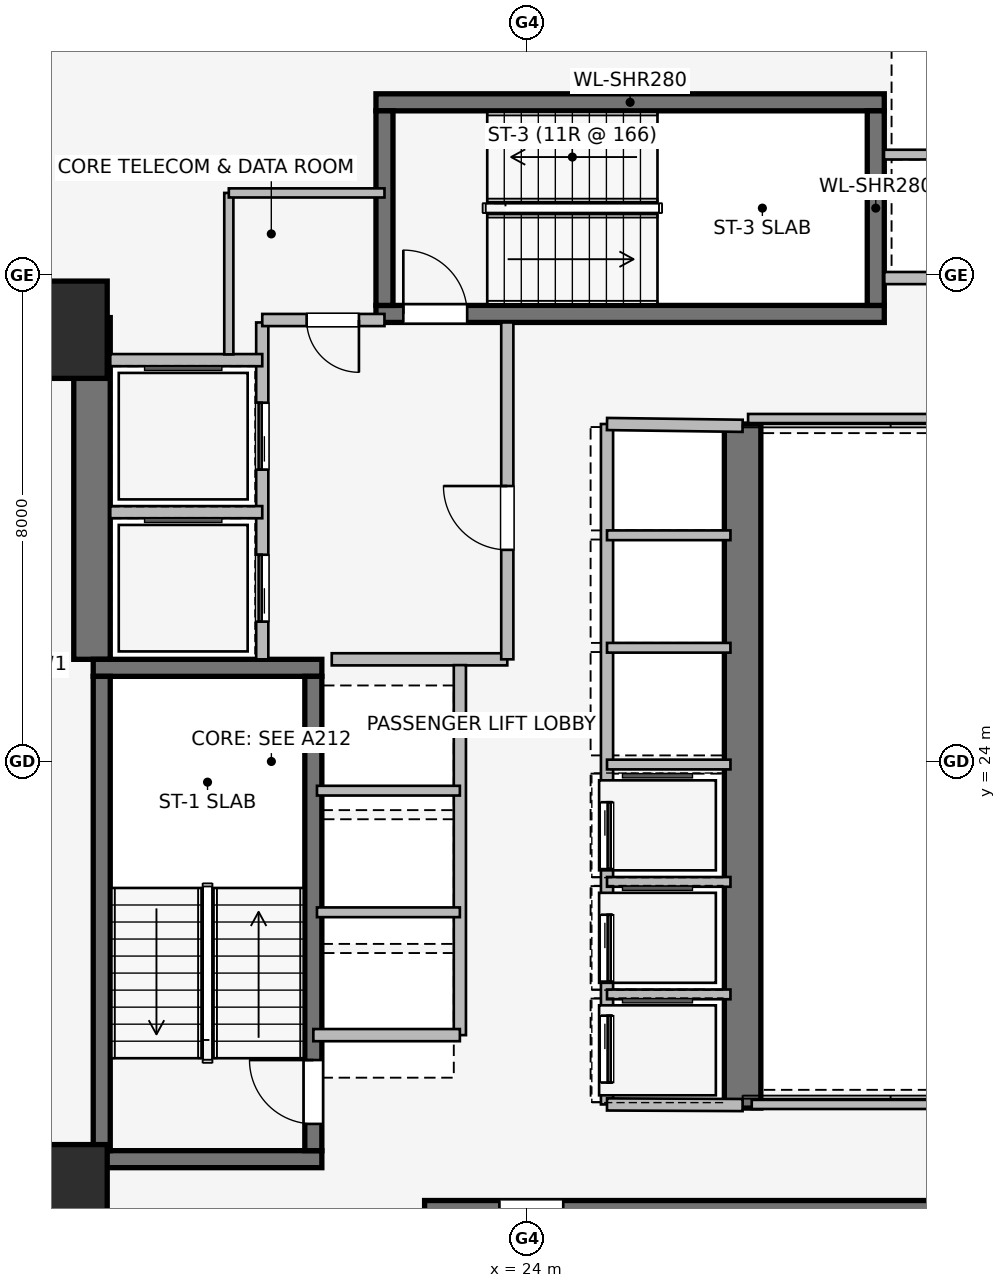
"""IFC4 building model, lengths in metres.
Left out: names, types, materials, properties, quantities, classifications, styles, units other than length and angle.
Written with IfcOpenShell. Run it as: python <this file> out.ifc"""

import sys

from ifc_helpers import new_model, si_unit, direction, frame, frame_2d, origin, origin_2d, place, context, subcontext, project, spatial, rectangle, extrude, element, fill, save


model = new_model("IFC4")
c1 = context("Model", 3, precision=1e-05, world=origin(), true_north=direction((0.0, 1.0)))
c2 = subcontext(c1, "Body", "Model", "MODEL_VIEW")
j1 = project(units=[si_unit("LENGTHUNIT", "METRE"), si_unit("PLANEANGLEUNIT", "RADIAN")], contexts=[c1])
p1 = place(None, origin())
s1 = spatial("IfcSite", under=j1, at=p1, CompositionType="ELEMENT")
p2 = place(p1, origin())
s2 = spatial("IfcBuilding", under=s1, at=p2, CompositionType="ELEMENT")
p3 = place(p2, frame((0.0, 0.0, 41.6)))
s3 = spatial("IfcBuildingStorey", under=s2, at=p3, CompositionType="ELEMENT", Elevation=41.6)
p4 = place(p3, frame((16.85, 25.68, 0.0), z_axis=(0.0, 0.0, 1.0), x_axis=(0.0, 1.0, 0.0)))
e1 = element("IfcWall", 1, at=p4, inside=s3, PredefinedType="SHEAR", context=c2, shape_type="SweptSolid", body=[
    extrude(rectangle(XDim=5.62, YDim=0.6, at=frame_2d((2.81, 0.0))), origin(), (0.0, 0.0, 1.0), 3.65),
])
p5 = place(p3, frame((27.55, 29.55, 0.0), z_axis=(0.0, 0.0, 1.0), x_axis=(0.0, -1.0, 0.0)))
e2 = element("IfcWall", 2, at=p5, inside=s3, PredefinedType="SHEAR", context=c2, shape_type="SweptSolid", body=[
    extrude(rectangle(XDim=11.25, YDim=0.6, at=frame_2d((5.625, 0.0))), origin(), (0.0, 0.0, 1.0), 3.65),
])
for number, where, z_axis, x_axis in (
    (3, (16.87, 17.46, 0.0), (0.0, 0.0, 1.0), (1.0, 0.0, 0.0)),
    (4, (20.63, 25.54, 0.0), (0.0, 0.0, 1.0), (-1.0, 0.0, 0.0)),
):
    element("IfcWall", number, at=place(p3, frame(where, z_axis=z_axis, x_axis=x_axis)), inside=s3, PredefinedType="SHEAR", context=c2, shape_type="SweptSolid", body=[
        extrude(rectangle(XDim=3.76, YDim=0.28, at=frame_2d((1.88, 0.0))), origin(), (0.0, 0.0, 1.0), 3.65),
    ])
p6 = place(p3, frame((17.01, 25.4, 0.0), z_axis=(0.0, 0.0, 1.0), x_axis=(0.0, -1.0, 0.0)))
e5 = element("IfcWall", 5, at=p6, inside=s3, PredefinedType="SHEAR", context=c2, shape_type="SweptSolid", body=[
    extrude(rectangle(XDim=7.8, YDim=0.28, at=frame_2d((3.9, 0.0))), origin(), (0.0, 0.0, 1.0), 3.65),
])
p7 = place(p3, frame((20.49, 17.6, 0.0), z_axis=(0.0, 0.0, 1.0), x_axis=(0.0, 1.0, 0.0)))
e6 = element("IfcWall", 6, at=p7, inside=s3, PredefinedType="SHEAR", context=c2, shape_type="SweptSolid", body=[
    extrude(rectangle(XDim=7.8, YDim=0.28, at=frame_2d((3.9, 0.0))), origin(), (0.0, 0.0, 1.0), 3.65),
])
p8 = place(p7, frame((0.44, 0.0, 0.0)))
e7 = element("IfcOpeningElement", 7, at=p8, cuts=e6, PredefinedType="OPENING", context=c2, shape_type="SweptSolid", body=[
    extrude(rectangle(XDim=1.05, YDim=2.0, at=frame_2d((0.525, 1.0))), frame((0.0, 0.15, 0.0), z_axis=(0.0, -1.0, 0.0), x_axis=(1.0, 0.0, 0.0)), (0.0, 0.0, 1.0), 0.3),
])
p9 = place(p3, frame((30.68, 16.64, 0.0), z_axis=(0.0, 0.0, 1.0), x_axis=(-1.0, 0.0, 0.0)))
e8 = element("IfcWall", 8, at=p9, inside=s3, PredefinedType="SHEAR", context=c2, shape_type="SweptSolid", body=[
    extrude(rectangle(XDim=8.36, YDim=0.28, at=frame_2d((4.18, 0.0))), origin(), (0.0, 0.0, 1.0), 3.65),
])
p10 = place(p9, frame((6.08, 0.0, 0.0)))
e9 = element("IfcOpeningElement", 9, at=p10, cuts=e8, PredefinedType="OPENING", context=c2, shape_type="SweptSolid", body=[
    extrude(rectangle(XDim=1.05, YDim=2.0, at=frame_2d((0.525, 1.0))), frame((0.0, 0.15, 0.0), z_axis=(0.0, -1.0, 0.0), x_axis=(1.0, 0.0, 0.0)), (0.0, 0.0, 1.0), 0.3),
])
p11 = place(p3, frame((21.52, 31.36, 0.0), z_axis=(0.0, 0.0, 1.0), x_axis=(1.0, 0.0, 0.0)))
e10 = element("IfcWall", 10, at=p11, inside=s3, PredefinedType="SHEAR", context=c2, shape_type="SweptSolid", body=[
    extrude(rectangle(XDim=8.36, YDim=0.28, at=frame_2d((4.18, 0.0))), origin(), (0.0, 0.0, 1.0), 3.65),
])
p12 = place(p11, frame((0.45, 0.0, 0.0)))
e11 = element("IfcOpeningElement", 11, at=p12, cuts=e10, PredefinedType="OPENING", context=c2, shape_type="SweptSolid", body=[
    extrude(rectangle(XDim=1.05, YDim=2.0, at=frame_2d((0.525, 1.0))), frame((0.0, 0.15, 0.0), z_axis=(0.0, -1.0, 0.0), x_axis=(1.0, 0.0, 0.0)), (0.0, 0.0, 1.0), 0.3),
])
p13 = place(p3, frame((29.88, 34.84, 0.0), z_axis=(0.0, 0.0, 1.0), x_axis=(-1.0, 0.0, 0.0)))
e12 = element("IfcWall", 12, at=p13, inside=s3, PredefinedType="SHEAR", context=c2, shape_type="SweptSolid", body=[
    extrude(rectangle(XDim=8.36, YDim=0.28, at=frame_2d((4.18, 0.0))), origin(), (0.0, 0.0, 1.0), 3.65),
])
for number, where, z_axis, x_axis in (
    (13, (21.66, 34.7, 0.0), (0.0, 0.0, 1.0), (0.0, -1.0, 0.0)),
    (14, (29.74, 31.5, 0.0), (0.0, 0.0, 1.0), (0.0, 1.0, 0.0)),
):
    element("IfcWall", number, at=place(p3, frame(where, z_axis=z_axis, x_axis=x_axis)), inside=s3, PredefinedType="SHEAR", context=c2, shape_type="SweptSolid", body=[
        extrude(rectangle(XDim=3.2, YDim=0.28, at=frame_2d((1.6, 0.0))), origin(), (0.0, 0.0, 1.0), 3.65),
    ])
for number, where, z_axis, x_axis in (
    (15, (16.3, 16.9, 0.0), (0.0, 0.0, 1.0), (1.0, 0.0, 0.0)),
    (16, (16.3, 31.1, 0.0), (0.0, 0.0, 1.0), (1.0, 0.0, 0.0)),
):
    element("IfcColumn", number, at=place(p3, frame(where, z_axis=z_axis, x_axis=x_axis)), inside=s3, PredefinedType="COLUMN", context=c2, shape_type="SweptSolid", body=[
        extrude(rectangle(XDim=1.6, YDim=1.6, at=origin_2d()), origin(), (0.0, 0.0, 1.0), 3.65),
    ])
p14 = place(p3, frame((19.65, 25.68, 0.0), z_axis=(0.0, 0.0, 1.0), x_axis=(0.0, 1.0, 0.0)))
e17 = element("IfcWall", 17, at=p14, inside=s3, PredefinedType="PARTITIONING", context=c2, shape_type="SweptSolid", body=[
    extrude(rectangle(XDim=5.54, YDim=0.2, at=frame_2d((2.77, 0.0))), origin(), (0.0, 0.0, 1.0), 3.39),
])
p15 = place(p14, frame((0.62, 0.0, 0.0)))
e18 = element("IfcOpeningElement", 18, at=p15, cuts=e17, PredefinedType="OPENING", context=c2, shape_type="SweptSolid", body=[
    extrude(rectangle(XDim=1.1, YDim=2.2, at=frame_2d((0.55, 1.1))), frame((0.0, 0.11, 0.0), z_axis=(0.0, -1.0, 0.0), x_axis=(1.0, 0.0, 0.0)), (0.0, 0.0, 1.0), 0.22),
])
p16 = place(p14, frame((3.12, 0.0, 0.0)))
e19 = element("IfcOpeningElement", 19, at=p16, cuts=e17, PredefinedType="OPENING", context=c2, shape_type="SweptSolid", body=[
    extrude(rectangle(XDim=1.1, YDim=2.2, at=frame_2d((0.55, 1.1))), frame((0.0, 0.11, 0.0), z_axis=(0.0, -1.0, 0.0), x_axis=(1.0, 0.0, 0.0)), (0.0, 0.0, 1.0), 0.22),
])
p17 = place(p3, frame((20.793, 25.68, 0.0), z_axis=(0.0, 0.0, 1.0), x_axis=(1.0, 0.0, 0.0)))
e20 = element("IfcWall", 20, at=p17, inside=s3, PredefinedType="PARTITIONING", context=c2, shape_type="SweptSolid", body=[
    extrude(rectangle(XDim=2.887, YDim=0.2, at=frame_2d((1.443, 0.0))), origin(), (0.0, 0.0, 1.0), 3.39),
])
p18 = place(p3, frame((23.68, 25.68, 0.0), z_axis=(0.0, 0.0, 1.0), x_axis=(0.0, 1.0, 0.0)))
e21 = element("IfcWall", 21, at=p18, inside=s3, PredefinedType="PARTITIONING", context=c2, shape_type="SweptSolid", body=[
    extrude(rectangle(XDim=5.54, YDim=0.2, at=frame_2d((2.77, 0.0))), origin(), (0.0, 0.0, 1.0), 3.39),
])
p19 = place(p18, frame((1.8, 0.0, 0.0)))
e22 = element("IfcOpeningElement", 22, at=p19, cuts=e21, PredefinedType="OPENING", context=c2, shape_type="SweptSolid", body=[
    extrude(rectangle(XDim=1.05, YDim=2.0, at=frame_2d((0.525, 1.0))), frame((0.0, 0.11, 0.0), z_axis=(0.0, -1.0, 0.0), x_axis=(1.0, 0.0, 0.0)), (0.0, 0.0, 1.0), 0.22),
])
p20 = place(p3, frame((21.66, 31.26, 0.0), z_axis=(0.0, 0.0, 1.0), x_axis=(-1.0, 0.0, 0.0)))
e23 = element("IfcWall", 23, at=p20, inside=s3, PredefinedType="PARTITIONING", context=c2, shape_type="SweptSolid", body=[
    extrude(rectangle(XDim=2.01, YDim=0.2, at=frame_2d((1.005, 0.0))), origin(), (0.0, 0.0, 1.0), 3.39),
])
p21 = place(p20, frame((0.42, 0.0, 0.0)))
e24 = element("IfcOpeningElement", 24, at=p21, cuts=e23, PredefinedType="OPENING", context=c2, shape_type="SweptSolid", body=[
    extrude(rectangle(XDim=0.86, YDim=2.0, at=frame_2d((0.43, 1.0))), frame((0.0, 0.11, 0.0), z_axis=(0.0, -1.0, 0.0), x_axis=(1.0, 0.0, 0.0)), (0.0, 0.0, 1.0), 0.22),
])
p22 = place(p3, frame((17.15, 28.1, 0.0), z_axis=(0.0, 0.0, 1.0), x_axis=(1.0, 0.0, 0.0)))
e25 = element("IfcWall", 25, at=p22, inside=s3, PredefinedType="PARTITIONING", context=c2, shape_type="SweptSolid", body=[
    extrude(rectangle(XDim=2.5, YDim=0.2, at=frame_2d((1.25, 0.0))), origin(), (0.0, 0.0, 1.0), 3.39),
])
p23 = place(p3, frame((19.65, 30.6, 0.0), z_axis=(0.0, 0.0, 1.0), x_axis=(-1.0, 0.0, 0.0)))
e26 = element("IfcWall", 26, at=p23, inside=s3, PredefinedType="PARTITIONING", context=c2, shape_type="SweptSolid", body=[
    extrude(rectangle(XDim=2.5, YDim=0.2, at=frame_2d((1.25, 0.0))), origin(), (0.0, 0.0, 1.0), 2.29),
])
p24 = place(p3, frame((32.48, 31.95, 0.0), z_axis=(0.0, 0.0, 1.0), x_axis=(-1.0, 0.0, 0.0)))
e27 = element("IfcWall", 27, at=p24, inside=s3, PredefinedType="PARTITIONING", context=c2, shape_type="SweptSolid", body=[
    extrude(rectangle(XDim=2.6, YDim=0.2, at=frame_2d((1.3, 0.0))), origin(), (0.0, 0.0, 1.0), 3.39),
])
p25 = place(p3, frame((29.875, 33.98, 0.0), z_axis=(0.0, 0.0, 1.0), x_axis=(1.0, 0.0, 0.0)))
e28 = element("IfcWall", 28, at=p25, inside=s3, PredefinedType="PARTITIONING", context=c2, shape_type="SweptSolid", body=[
    extrude(rectangle(XDim=2.605, YDim=0.16, at=frame_2d((1.302, 0.0))), origin(), (0.0, 0.0, 1.0), 3.39),
])
p26 = place(p3, frame((22.9, 19.5, 0.0), z_axis=(0.0, 0.0, 1.0), x_axis=(0.0, 1.0, 0.0)))
e29 = element("IfcWall", 29, at=p26, inside=s3, PredefinedType="PARTITIONING", context=c2, shape_type="SweptSolid", body=[
    extrude(rectangle(XDim=6.085, YDim=0.2, at=frame_2d((3.042, 0.0))), origin(), (0.0, 0.0, 1.0), 3.39),
])
p27 = place(p3, frame((20.49, 19.5, 0.0), z_axis=(0.0, 0.0, 1.0), x_axis=(1.0, 0.0, 0.0)))
e30 = element("IfcWall", 30, at=p27, inside=s3, PredefinedType="PARTITIONING", context=c2, shape_type="SweptSolid", body=[
    extrude(rectangle(XDim=2.41, YDim=0.2, at=frame_2d((1.205, 0.0))), origin(), (0.0, 0.0, 1.0), 2.29),
])
for number, where, z_axis, x_axis in (
    (31, (20.55, 21.52, 0.0), (0.0, 0.0, 1.0), (1.0, 0.0, 0.0)),
    (32, (20.55, 23.52, 0.0), (0.0, 0.0, 1.0), (1.0, 0.0, 0.0)),
):
    element("IfcWall", number, at=place(p3, frame(where, z_axis=z_axis, x_axis=x_axis)), inside=s3, PredefinedType="PARTITIONING", context=c2, shape_type="SweptSolid", body=[
        extrude(rectangle(XDim=2.35, YDim=0.16, at=frame_2d((1.175, 0.0))), origin(), (0.0, 0.0, 1.0), 3.39),
    ])
p28 = place(p3, frame((25.32, 29.55, 0.0), z_axis=(0.0, 0.0, 1.0), x_axis=(0.0, -1.0, 0.0)))
e33 = element("IfcWall", 33, at=p28, inside=s3, PredefinedType="PARTITIONING", context=c2, shape_type="SweptSolid", body=[
    extrude(rectangle(XDim=11.19, YDim=0.2, at=frame_2d((5.595, 0.0))), origin(), (0.0, 0.0, 1.0), 3.39),
])
p29 = place(p28, frame((6.22, 0.0, 0.0)))
e34 = element("IfcOpeningElement", 34, at=p29, cuts=e33, PredefinedType="OPENING", context=c2, shape_type="SweptSolid", body=[
    extrude(rectangle(XDim=1.1, YDim=2.2, at=frame_2d((0.55, 1.1))), frame((0.0, 0.11, 0.0), z_axis=(0.0, -1.0, 0.0), x_axis=(1.0, 0.0, 0.0)), (0.0, 0.0, 1.0), 0.22),
])
p30 = place(p28, frame((8.07, 0.0, 0.0)))
e35 = element("IfcOpeningElement", 35, at=p30, cuts=e33, PredefinedType="OPENING", context=c2, shape_type="SweptSolid", body=[
    extrude(rectangle(XDim=1.1, YDim=2.2, at=frame_2d((0.55, 1.1))), frame((0.0, 0.11, 0.0), z_axis=(0.0, -1.0, 0.0), x_axis=(1.0, 0.0, 0.0)), (0.0, 0.0, 1.0), 0.22),
])
p31 = place(p28, frame((9.73, 0.0, 0.0)))
e36 = element("IfcOpeningElement", 36, at=p31, cuts=e33, PredefinedType="OPENING", context=c2, shape_type="SweptSolid", body=[
    extrude(rectangle(XDim=1.1, YDim=2.2, at=frame_2d((0.55, 1.1))), frame((0.0, 0.11, 0.0), z_axis=(0.0, -1.0, 0.0), x_axis=(1.0, 0.0, 0.0)), (0.0, 0.0, 1.0), 0.22),
])
p32 = place(p3, frame((25.32, 18.36, 0.0), z_axis=(0.0, 0.0, 1.0), x_axis=(0.999989925833, -0.004488678231, 0.0)))
e37 = element("IfcWall", 37, at=p32, inside=s3, PredefinedType="PARTITIONING", context=c2, shape_type="SweptSolid", body=[
    extrude(rectangle(XDim=2.23, YDim=0.2, at=frame_2d((1.115, 0.0))), origin(), (0.0, 0.0, 1.0), 3.39),
])
p33 = place(p3, frame((27.55, 29.52, 0.0), z_axis=(0.0, 0.0, 1.0), x_axis=(-0.999909343457, 0.013464949556, 0.0)))
e38 = element("IfcWall", 38, at=p33, inside=s3, PredefinedType="PARTITIONING", context=c2, shape_type="SweptSolid", body=[
    extrude(rectangle(XDim=2.23, YDim=0.2, at=frame_2d((1.115, 0.0))), origin(), (0.0, 0.0, 1.0), 2.29),
])
for number, where, z_axis, x_axis in (
    (39, (25.32, 20.17, 0.0), (0.0, 0.0, 1.0), (1.0, 0.0, 0.0)),
    (40, (25.32, 22.02, 0.0), (0.0, 0.0, 1.0), (1.0, 0.0, 0.0)),
    (41, (25.32, 23.95, 0.0), (0.0, 0.0, 1.0), (1.0, 0.0, 0.0)),
    (42, (25.32, 25.87, 0.0), (0.0, 0.0, 1.0), (1.0, 0.0, 0.0)),
    (43, (25.32, 27.72, 0.0), (0.0, 0.0, 1.0), (1.0, 0.0, 0.0)),
):
    element("IfcWall", number, at=place(p3, frame(where, z_axis=z_axis, x_axis=x_axis)), inside=s3, PredefinedType="PARTITIONING", context=c2, shape_type="SweptSolid", body=[
        extrude(rectangle(XDim=2.03, YDim=0.16, at=frame_2d((1.015, 0.0))), origin(), (0.0, 0.0, 1.0), 3.39),
    ])
p34 = place(p3, frame((19.1, 33.35, 0.0), z_axis=(0.0, 0.0, 1.0), x_axis=(0.0, -1.0, 0.0)))
e44 = element("IfcWall", 44, at=p34, inside=s3, PredefinedType="PARTITIONING", context=c2, shape_type="SweptSolid", body=[
    extrude(rectangle(XDim=2.655, YDim=0.15, at=frame_2d((1.328, 0.0))), origin(), (0.0, 0.0, 1.0), 3.39),
])
p35 = place(p3, frame((21.66, 33.35, 0.0), z_axis=(0.0, 0.0, 1.0), x_axis=(-1.0, 0.0, 0.0)))
e45 = element("IfcWall", 45, at=p35, inside=s3, PredefinedType="PARTITIONING", context=c2, shape_type="SweptSolid", body=[
    extrude(rectangle(XDim=2.56, YDim=0.15, at=frame_2d((1.28, 0.0))), origin(), (0.0, 0.0, 1.0), 3.39),
])
p36 = place(p3, frame((27.7, 18.36, 0.0), z_axis=(0.0, 0.0, 1.0), x_axis=(1.0, 0.0, 0.0)))
e46 = element("IfcWall", 46, at=p36, inside=s3, PredefinedType="PARTITIONING", context=c2, shape_type="SweptSolid", body=[
    extrude(rectangle(XDim=12.14, YDim=0.15, at=frame_2d((6.07, 0.0))), origin(), (0.0, 0.0, 1.0), 2.531),
])
p37 = place(p3, frame((39.84, 29.64, 0.0), z_axis=(0.0, 0.0, 1.0), x_axis=(-1.0, 0.0, 0.0)))
e47 = element("IfcWall", 47, at=p37, inside=s3, PredefinedType="PARTITIONING", context=c2, shape_type="SweptSolid", body=[
    extrude(rectangle(XDim=12.2, YDim=0.15, at=frame_2d((6.1, 0.0))), origin(), (0.0, 0.0, 1.0), 2.531),
])
p38 = place(p8, origin())
e48 = element("IfcDoor", 48, at=p38, inside=s3, OperationType="SINGLE_SWING_RIGHT", PredefinedType="DOOR", context=c2, shape_type="SweptSolid", body=[
    extrude(rectangle(XDim=1.05, YDim=2.0, at=frame_2d((0.525, 1.0))), frame((0.0, 0.025, 0.0), z_axis=(0.0, -1.0, 0.0), x_axis=(1.0, 0.0, 0.0)), (0.0, 0.0, 1.0), 0.05),
])
fill(e7, e48)
p39 = place(p10, origin())
e49 = element("IfcDoor", 49, at=p39, inside=s3, OperationType="SINGLE_SWING_RIGHT", PredefinedType="DOOR", context=c2, shape_type="SweptSolid", body=[
    extrude(rectangle(XDim=1.05, YDim=2.0, at=frame_2d((0.525, 1.0))), frame((0.0, 0.025, 0.0), z_axis=(0.0, -1.0, 0.0), x_axis=(1.0, 0.0, 0.0)), (0.0, 0.0, 1.0), 0.05),
])
fill(e9, e49)
p40 = place(p12, origin())
e50 = element("IfcDoor", 50, at=p40, inside=s3, OperationType="SINGLE_SWING_LEFT", PredefinedType="DOOR", context=c2, shape_type="SweptSolid", body=[
    extrude(rectangle(XDim=1.05, YDim=2.0, at=frame_2d((0.525, 1.0))), frame((0.0, 0.025, 0.0), z_axis=(0.0, -1.0, 0.0), x_axis=(1.0, 0.0, 0.0)), (0.0, 0.0, 1.0), 0.05),
])
fill(e11, e50)
p41 = place(p15, origin())
e51 = element("IfcDoor", 51, at=p41, inside=s3, OperationType="SLIDING_TO_LEFT", PredefinedType="DOOR", context=c2, shape_type="SweptSolid", body=[
    extrude(rectangle(XDim=1.1, YDim=2.2, at=frame_2d((0.55, 1.1))), frame((0.0, 0.025, 0.0), z_axis=(0.0, -1.0, 0.0), x_axis=(1.0, 0.0, 0.0)), (0.0, 0.0, 1.0), 0.05),
])
fill(e18, e51)
p42 = place(p16, origin())
e52 = element("IfcDoor", 52, at=p42, inside=s3, OperationType="SLIDING_TO_LEFT", PredefinedType="DOOR", context=c2, shape_type="SweptSolid", body=[
    extrude(rectangle(XDim=1.1, YDim=2.2, at=frame_2d((0.55, 1.1))), frame((0.0, 0.025, 0.0), z_axis=(0.0, -1.0, 0.0), x_axis=(1.0, 0.0, 0.0)), (0.0, 0.0, 1.0), 0.05),
])
fill(e19, e52)
p43 = place(p19, origin())
e53 = element("IfcDoor", 53, at=p43, inside=s3, OperationType="SINGLE_SWING_RIGHT", PredefinedType="DOOR", context=c2, shape_type="SweptSolid", body=[
    extrude(rectangle(XDim=1.05, YDim=2.0, at=frame_2d((0.525, 1.0))), frame((0.0, 0.025, 0.0), z_axis=(0.0, -1.0, 0.0), x_axis=(1.0, 0.0, 0.0)), (0.0, 0.0, 1.0), 0.05),
])
fill(e22, e53)
p44 = place(p21, origin())
e54 = element("IfcDoor", 54, at=p44, inside=s3, OperationType="SINGLE_SWING_LEFT", PredefinedType="DOOR", context=c2, shape_type="SweptSolid", body=[
    extrude(rectangle(XDim=0.86, YDim=2.0, at=frame_2d((0.43, 1.0))), frame((0.0, 0.025, 0.0), z_axis=(0.0, -1.0, 0.0), x_axis=(1.0, 0.0, 0.0)), (0.0, 0.0, 1.0), 0.05),
])
fill(e24, e54)
p45 = place(p29, origin())
e55 = element("IfcDoor", 55, at=p45, inside=s3, OperationType="SLIDING_TO_LEFT", PredefinedType="DOOR", context=c2, shape_type="SweptSolid", body=[
    extrude(rectangle(XDim=1.1, YDim=2.2, at=frame_2d((0.55, 1.1))), frame((0.0, 0.025, 0.0), z_axis=(0.0, -1.0, 0.0), x_axis=(1.0, 0.0, 0.0)), (0.0, 0.0, 1.0), 0.05),
])
fill(e34, e55)
p46 = place(p30, origin())
e56 = element("IfcDoor", 56, at=p46, inside=s3, OperationType="SLIDING_TO_LEFT", PredefinedType="DOOR", context=c2, shape_type="SweptSolid", body=[
    extrude(rectangle(XDim=1.1, YDim=2.2, at=frame_2d((0.55, 1.1))), frame((0.0, 0.025, 0.0), z_axis=(0.0, -1.0, 0.0), x_axis=(1.0, 0.0, 0.0)), (0.0, 0.0, 1.0), 0.05),
])
fill(e35, e56)
p47 = place(p31, origin())
e57 = element("IfcDoor", 57, at=p47, inside=s3, OperationType="SLIDING_TO_LEFT", PredefinedType="DOOR", context=c2, shape_type="SweptSolid", body=[
    extrude(rectangle(XDim=1.1, YDim=2.2, at=frame_2d((0.55, 1.1))), frame((0.0, 0.025, 0.0), z_axis=(0.0, -1.0, 0.0), x_axis=(1.0, 0.0, 0.0)), (0.0, 0.0, 1.0), 0.05),
])
fill(e36, e57)
save(model, sys.argv[1])
